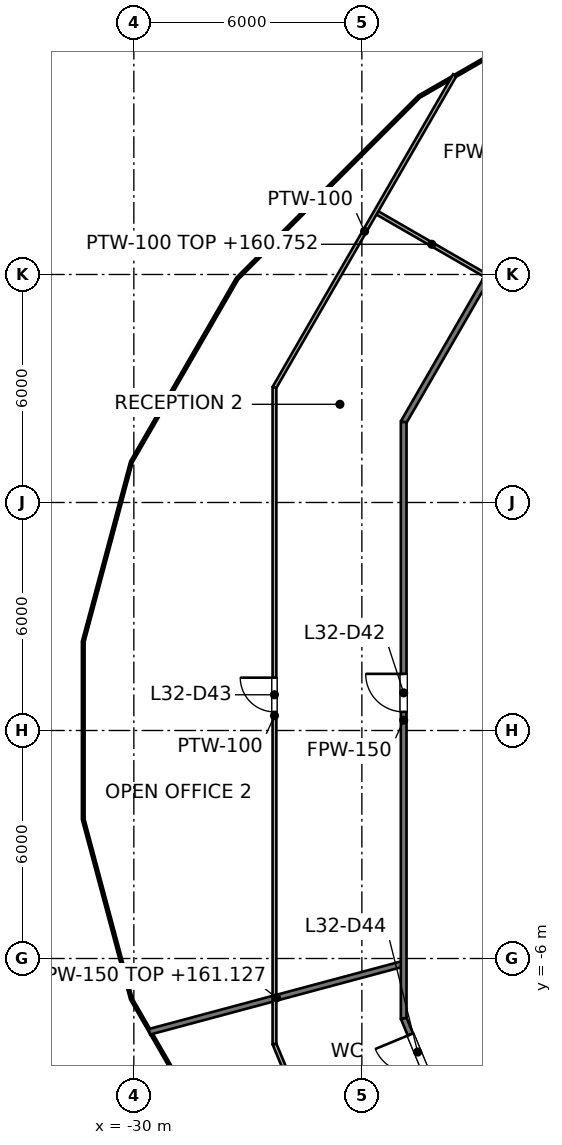
"""IFC4 building model, lengths in metres.
Left out: names, types, materials, properties, quantities, classifications, styles, units other than length and angle.
Written with IfcOpenShell. Run it as: python <this file> out.ifc"""

import sys

from ifc_helpers import new_model, si_unit, direction, frame, frame_2d, origin, place, context, subcontext, project, spatial, rectangle, extrude, element, fill, save


model = new_model("IFC4")
c1 = context("Model", 3, precision=1e-05, world=origin(), true_north=direction((0.0, 1.0)))
c2 = subcontext(c1, "Body", "Model", "MODEL_VIEW")
j1 = project(units=[si_unit("LENGTHUNIT", "METRE"), si_unit("PLANEANGLEUNIT", "RADIAN")], contexts=[c1])
p1 = place(None, origin())
s1 = spatial("IfcSite", under=j1, at=p1, CompositionType="ELEMENT")
p2 = place(p1, origin())
s2 = spatial("IfcBuilding", under=s1, at=p2, CompositionType="ELEMENT")
p3 = place(p2, frame((0.0, 0.0, 157.6)))
s3 = spatial("IfcBuildingStorey", under=s2, at=p3, CompositionType="ELEMENT", Elevation=157.6)
p4 = place(p3, frame((-22.9, -7.572, 0.0), z_axis=(0.0, 0.0, 1.0), x_axis=(0.382860357704, -0.923806227788, 0.0)))
e1 = element("IfcWall", 1, at=p4, inside=s3, PredefinedType="PARTITIONING", context=c2, shape_type="SweptSolid", body=[
    extrude(rectangle(XDim=6.374, YDim=0.15, at=frame_2d((3.187, 0.0))), origin(), (0.0, 0.0, 1.0), 2.995),
])
p5 = place(p4, frame((0.462, 0.0, 0.0)))
e2 = element("IfcOpeningElement", 2, at=p5, cuts=e1, PredefinedType="OPENING", context=c2, shape_type="SweptSolid", body=[
    extrude(rectangle(XDim=1.0, YDim=2.1, at=frame_2d((0.5, 1.05))), frame((0.0, 0.075, 0.0), z_axis=(0.0, -1.0, 0.0), x_axis=(1.0, 0.0, 0.0)), (0.0, 0.0, 1.0), 0.15),
])
p6 = place(p3, frame((-29.591, -7.929, 0.0), z_axis=(0.0, 0.0, 1.0), x_axis=(0.965923037728, 0.258829451931, 0.0)))
e3 = element("IfcWall", 3, at=p6, inside=s3, PredefinedType="PARTITIONING", context=c2, shape_type="SweptSolid", body=[
    extrude(rectangle(XDim=6.927, YDim=0.15, at=frame_2d((3.464, 0.0))), origin(), (0.0, 0.0, 1.0), 3.527),
])
p7 = place(p3, frame((-22.9, 8.117, 0.0), z_axis=(0.0, 0.0, 1.0), x_axis=(0.5000050195, 0.866022505755, 0.0)))
e4 = element("IfcWall", 4, at=p7, inside=s3, PredefinedType="PARTITIONING", context=c2, shape_type="SweptSolid", body=[
    extrude(rectangle(XDim=8.626, YDim=0.15, at=frame_2d((4.313, 0.0))), origin(), (0.0, 0.0, 1.0), 2.927),
])
p8 = place(p3, frame((-22.9, -7.572, 0.0), z_axis=(0.0, 0.0, 1.0), x_axis=(0.0, 1.0, 0.0)))
e5 = element("IfcWall", 5, at=p8, inside=s3, PredefinedType="PARTITIONING", context=c2, shape_type="SweptSolid", body=[
    extrude(rectangle(XDim=15.689, YDim=0.15, at=frame_2d((7.844, 0.0))), origin(), (0.0, 0.0, 1.0), 2.927),
])
p9 = place(p8, frame((8.062, 0.0, 0.0)))
e6 = element("IfcOpeningElement", 6, at=p9, cuts=e5, PredefinedType="OPENING", context=c2, shape_type="SweptSolid", body=[
    extrude(rectangle(XDim=1.0, YDim=2.1, at=frame_2d((0.5, 1.05))), frame((0.0, 0.075, 0.0), z_axis=(0.0, -1.0, 0.0), x_axis=(1.0, 0.0, 0.0)), (0.0, 0.0, 1.0), 0.15),
])
p10 = place(p3, frame((-26.3, -8.249, 0.0), z_axis=(0.0, 0.0, 1.0), x_axis=(0.382878044957, -0.92379889732, 0.0)))
e7 = element("IfcWall", 7, at=p10, inside=s3, PredefinedType="PARTITIONING", context=c2, shape_type="SweptSolid", body=[
    extrude(rectangle(XDim=2.745, YDim=0.1, at=frame_2d((1.373, 0.0))), origin(), (0.0, 0.0, 1.0), 3.076),
])
p11 = place(p3, frame((-23.634, 13.645, 0.0), z_axis=(0.0, 0.0, 1.0), x_axis=(0.866002606077, -0.500039484709, 0.0)))
e8 = element("IfcWall", 8, at=p11, inside=s3, PredefinedType="PARTITIONING", context=c2, shape_type="SweptSolid", body=[
    extrude(rectangle(XDim=3.4, YDim=0.1, at=frame_2d((1.7, 0.0))), origin(), (0.0, 0.0, 1.0), 3.152),
])
p12 = place(p3, frame((-26.3, 9.028, 0.0), z_axis=(0.0, 0.0, 1.0), x_axis=(0.499994996542, 0.866028292513, 0.0)))
e9 = element("IfcWall", 9, at=p12, inside=s3, PredefinedType="PARTITIONING", context=c2, shape_type="SweptSolid", body=[
    extrude(rectangle(XDim=9.486, YDim=0.1, at=frame_2d((4.743, 0.0))), origin(), (0.0, 0.0, 1.0), 2.927),
])
p13 = place(p3, frame((-26.3, -8.249, 0.0), z_axis=(0.0, 0.0, 1.0), x_axis=(0.0, 1.0, 0.0)))
e10 = element("IfcWall", 10, at=p13, inside=s3, PredefinedType="PARTITIONING", context=c2, shape_type="SweptSolid", body=[
    extrude(rectangle(XDim=17.277, YDim=0.1, at=frame_2d((8.639, 0.0))), origin(), (0.0, 0.0, 1.0), 2.927),
])
p14 = place(p13, frame((8.739, 0.0, 0.0)))
e11 = element("IfcOpeningElement", 11, at=p14, cuts=e10, PredefinedType="OPENING", context=c2, shape_type="SweptSolid", body=[
    extrude(rectangle(XDim=0.9, YDim=2.1, at=frame_2d((0.45, 1.05))), frame((0.0, 0.05, 0.0), z_axis=(0.0, -1.0, 0.0), x_axis=(1.0, 0.0, 0.0)), (0.0, 0.0, 1.0), 0.1),
])
p15 = place(p9, origin())
e12 = element("IfcDoor", 12, at=p15, inside=s3, OperationType="SINGLE_SWING_RIGHT", PredefinedType="DOOR", context=c2, shape_type="SweptSolid", body=[
    extrude(rectangle(XDim=1.0, YDim=2.1, at=frame_2d((0.5, 1.05))), frame((0.0, 0.025, 0.0), z_axis=(0.0, -1.0, 0.0), x_axis=(1.0, 0.0, 0.0)), (0.0, 0.0, 1.0), 0.05),
])
fill(e6, e12)
p16 = place(p14, origin())
e13 = element("IfcDoor", 13, at=p16, inside=s3, OperationType="SINGLE_SWING_RIGHT", PredefinedType="DOOR", context=c2, shape_type="SweptSolid", body=[
    extrude(rectangle(XDim=0.9, YDim=2.1, at=frame_2d((0.45, 1.05))), frame((0.0, 0.025, 0.0), z_axis=(0.0, -1.0, 0.0), x_axis=(1.0, 0.0, 0.0)), (0.0, 0.0, 1.0), 0.05),
])
fill(e11, e13)
p17 = place(p5, origin())
e14 = element("IfcDoor", 14, at=p17, inside=s3, OperationType="SINGLE_SWING_LEFT", PredefinedType="DOOR", context=c2, shape_type="SweptSolid", body=[
    extrude(rectangle(XDim=1.0, YDim=2.1, at=frame_2d((0.5, 1.05))), frame((0.0, 0.025, 0.0), z_axis=(0.0, -1.0, 0.0), x_axis=(1.0, 0.0, 0.0)), (0.0, 0.0, 1.0), 0.05),
])
fill(e2, e14)
save(model, sys.argv[1])
